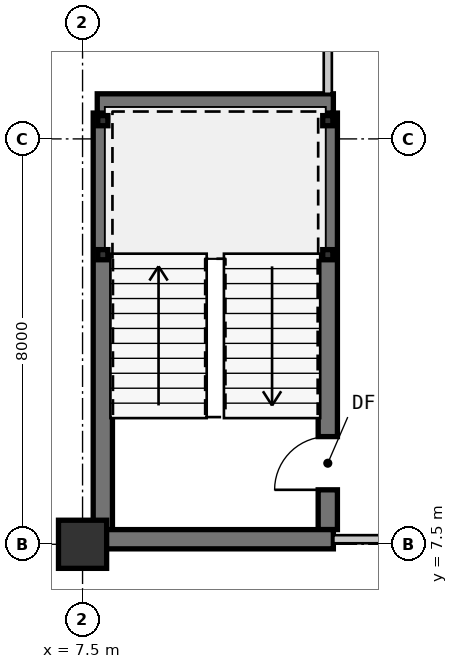
"""IFC4 building model, lengths in metres.
Left out: names, types, materials, properties, quantities, classifications, styles, units other than length and angle.
Written with IfcOpenShell. Run it as: python <this file> out.ifc"""

import sys

from ifc_helpers import new_model, si_unit, direction, frame, frame_2d, origin, origin_2d, place, context, subcontext, project, spatial, rectangle, hollow_rectangle, extrude, source, transform, mapped, element, fill, save


model = new_model("IFC4")
c1 = context("Model", 3, precision=1e-05, world=origin(), true_north=direction((0.0, 1.0)))
c2 = subcontext(c1, "Body", "Model", "MODEL_VIEW")
j1 = project(units=[si_unit("LENGTHUNIT", "METRE"), si_unit("PLANEANGLEUNIT", "RADIAN")], contexts=[c1])
p1 = place(None, origin())
s1 = spatial("IfcSite", under=j1, at=p1, CompositionType="ELEMENT")
p2 = place(p1, origin())
s2 = spatial("IfcBuilding", under=s1, at=p2, CompositionType="ELEMENT")
p3 = place(p2, frame((0.0, 0.0, -8.0)))
s3 = spatial("IfcBuildingStorey", under=s2, at=p3, CompositionType="ELEMENT", Elevation=-8.0)
m1 = source(origin(), c2, "Body", "SweptSolid", [
    extrude(rectangle(XDim=0.95, YDim=0.95, at=origin_2d()), origin(), (0.0, 0.0, 1.0), 4.0),
])
p4 = place(p3, frame((7.5, 7.5, 0.0), z_axis=(0.0, 0.0, 1.0), x_axis=(1.0, 0.0, 0.0)))
e1 = element("IfcColumn", 1, at=p4, inside=s3, PredefinedType="COLUMN", context=c2, shape_type="MappedRepresentation", body=[
    mapped(m1, transform((0.0, 0.0, 0.0), scale=1.0)),
])
m2 = source(origin(), c2, "Body", "SweptSolid", [
    extrude(hollow_rectangle(XDim=0.2, YDim=0.2, WallThickness=0.009, at=origin_2d()), origin(), (0.0, 0.0, 1.0), 4.0),
])
for number, where, z_axis, x_axis in (
    (2, (7.9, 13.215, 0.0), (0.0, 0.0, 1.0), (1.0, 0.0, 0.0)),
    (3, (12.34, 13.215, 0.0), (0.0, 0.0, 1.0), (1.0, 0.0, 0.0)),
    (4, (7.9, 15.86, 0.0), (0.0, 0.0, 1.0), (1.0, 0.0, 0.0)),
    (5, (12.34, 15.86, 0.0), (0.0, 0.0, 1.0), (1.0, 0.0, 0.0)),
):
    element("IfcColumn", number, at=place(p3, frame(where, z_axis=z_axis, x_axis=x_axis)), inside=s3, PredefinedType="COLUMN", context=c2, shape_type="MappedRepresentation", body=[
        mapped(m2, transform((0.0, 0.0, 0.0), scale=1.0)),
    ])
m3 = source(origin(), c2, "Body", "SweptSolid", [
    extrude(rectangle(XDim=8.22, YDim=0.38, at=frame_2d((4.11, 0.0))), origin(), (0.0, 0.0, 1.0), 3.72),
])
p5 = place(p3, frame((12.34, 16.01, 0.0), z_axis=(0.0, 0.0, 1.0), x_axis=(0.0, -1.0, 0.0)))
e6 = element("IfcWall", 6, at=p5, inside=s3, PredefinedType="SHEAR", context=c2, shape_type="MappedRepresentation", body=[
    mapped(m3, transform((0.0, 0.0, 0.0), scale=1.0)),
])
m4 = source(origin(), c2, "Body", "SweptSolid", [
    extrude(rectangle(XDim=1.05, YDim=2.1, at=frame_2d((0.525, 1.05))), frame((0.0, 0.2, 0.0), z_axis=(0.0, -1.0, 0.0), x_axis=(1.0, 0.0, 0.0)), (0.0, 0.0, 1.0), 0.4),
])
p6 = place(p5, frame((6.385, 0.0, 0.0)))
e7 = element("IfcOpeningElement", 7, at=p6, cuts=e6, PredefinedType="OPENING", context=c2, shape_type="MappedRepresentation", body=[
    mapped(m4, transform((0.0, 0.0, 0.0), scale=1.0)),
])
p7 = place(p3, frame((7.9, 7.79, 0.0), z_axis=(0.0, 0.0, 1.0), x_axis=(0.0, 1.0, 0.0)))
e8 = element("IfcWall", 8, at=p7, inside=s3, PredefinedType="SHEAR", context=c2, shape_type="MappedRepresentation", body=[
    mapped(m3, transform((0.0, 0.0, 0.0), scale=1.0)),
])
m5 = source(origin(), c2, "Body", "SweptSolid", [
    extrude(rectangle(XDim=4.66, YDim=0.38, at=frame_2d((2.33, 0.0))), origin(), (0.0, 0.0, 1.0), 3.72),
])
for number, where, z_axis, x_axis in (
    (9, (7.79, 16.2, 0.0), (0.0, 0.0, 1.0), (1.0, 0.0, 0.0)),
    (10, (12.45, 7.6, 0.0), (0.0, 0.0, 1.0), (-1.0, 0.0, 0.0)),
):
    element("IfcWall", number, at=place(p3, frame(where, z_axis=z_axis, x_axis=x_axis)), inside=s3, PredefinedType="SHEAR", context=c2, shape_type="MappedRepresentation", body=[
        mapped(m5, transform((0.0, 0.0, 0.0), scale=1.0)),
    ])
m6 = source(origin(), c2, "Body", "SweptSolid", [
    extrude(rectangle(XDim=5.03, YDim=0.16, at=frame_2d((2.515, 0.0))), origin(), (0.0, 0.0, 1.0), 3.72),
])
p8 = place(p3, frame((12.34, 16.39, 0.0), z_axis=(0.0, 0.0, 1.0), x_axis=(0.0, 1.0, 0.0)))
e11 = element("IfcWall", 11, at=p8, inside=s3, PredefinedType="PARTITIONING", context=c2, shape_type="MappedRepresentation", body=[
    mapped(m6, transform((0.0, 0.0, 0.0), scale=1.0)),
])
m7 = source(origin(), c2, "Body", "SweptSolid", [
    extrude(rectangle(XDim=2.47, YDim=0.16, at=frame_2d((1.235, 0.0))), origin(), (0.0, 0.0, 1.0), 3.72),
])
p9 = place(p3, frame((14.92, 7.6, 0.0), z_axis=(0.0, 0.0, 1.0), x_axis=(-1.0, 0.0, 0.0)))
e12 = element("IfcWall", 12, at=p9, inside=s3, PredefinedType="PARTITIONING", context=c2, shape_type="MappedRepresentation", body=[
    mapped(m7, transform((0.0, 0.0, 0.0), scale=1.0)),
])
m8 = source(origin(), c2, "Body", "SweptSolid", [
    extrude(rectangle(XDim=1.05, YDim=2.1, at=frame_2d((0.525, 1.05))), frame((0.0, 0.025, 0.0), z_axis=(0.0, -1.0, 0.0), x_axis=(1.0, 0.0, 0.0)), (0.0, 0.0, 1.0), 0.05),
])
p10 = place(p6, frame((1.05, 0.0, 0.0), z_axis=(0.0, 0.0, 1.0), x_axis=(-1.0, 0.0, 0.0)))
e13 = element("IfcDoor", 13, at=p10, inside=s3, OperationType="SINGLE_SWING_LEFT", PredefinedType="DOOR", context=c2, shape_type="MappedRepresentation", body=[
    mapped(m8, transform((0.0, 0.0, 0.0), scale=1.0)),
])
fill(e7, e13)
save(model, sys.argv[1])
